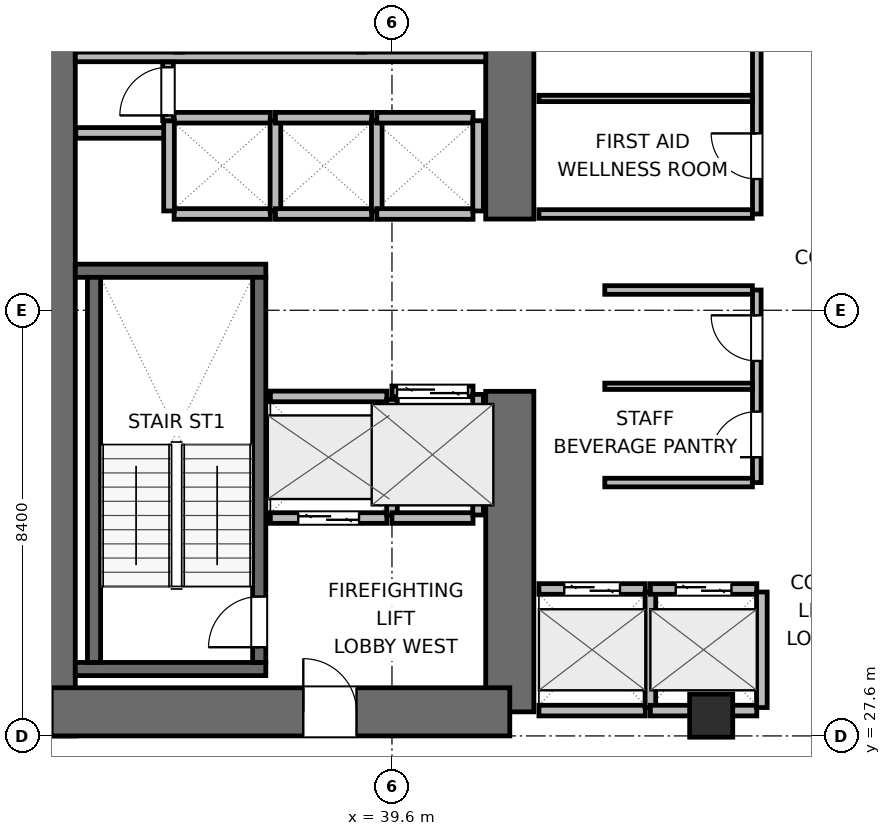
"""IFC4 building model, lengths in metres.
Left out: names, types, materials, properties, quantities, classifications, styles, units other than length and angle.
Written with IfcOpenShell. Run it as: python <this file> out.ifc"""

import sys

from ifc_helpers import new_model, si_unit, direction, frame, frame_2d, origin, origin_2d, place, context, subcontext, project, spatial, rectangle, extrude, element, fill, save


model = new_model("IFC4")
c1 = context("Model", 3, precision=1e-05, world=origin(), true_north=direction((0.0, 1.0)))
c2 = subcontext(c1, "Body", "Model", "MODEL_VIEW")
j1 = project(units=[si_unit("LENGTHUNIT", "METRE"), si_unit("PLANEANGLEUNIT", "RADIAN")], contexts=[c1])
p1 = place(None, origin())
s1 = spatial("IfcSite", under=j1, at=p1, CompositionType="ELEMENT")
p2 = place(p1, origin())
s2 = spatial("IfcBuilding", under=s1, at=p2, CompositionType="ELEMENT")
p3 = place(p2, frame((0.0, 0.0, 56.7)))
s3 = spatial("IfcBuildingStorey", under=s2, at=p3, CompositionType="ELEMENT", Elevation=56.7)
p4 = place(p3, frame((32.875, 27.6, 0.0), z_axis=(0.0, 0.0, 1.0), x_axis=(0.0, 1.0, 0.0)))
e1 = element("IfcWall", 1, at=p4, inside=s3, PredefinedType="SHEAR", context=c2, shape_type="SweptSolid", body=[
    extrude(rectangle(XDim=16.8, YDim=0.95, at=frame_2d((8.4, 0.0))), origin(), (0.0, 0.0, 1.0), 3.9),
])
p5 = place(p3, frame((41.925, 28.075, 0.0), z_axis=(0.0, 0.0, 1.0), x_axis=(0.0, 1.0, 0.0)))
e2 = element("IfcWall", 2, at=p5, inside=s3, PredefinedType="SHEAR", context=c2, shape_type="SweptSolid", body=[
    extrude(rectangle(XDim=6.325, YDim=0.95, at=frame_2d((3.163, 0.0))), origin(), (0.0, 0.0, 1.0), 3.9),
])
p6 = place(p3, frame((41.925, 37.8, 0.0), z_axis=(0.0, 0.0, 1.0), x_axis=(0.0, 1.0, 0.0)))
e3 = element("IfcWall", 3, at=p6, inside=s3, PredefinedType="SHEAR", context=c2, shape_type="SweptSolid", body=[
    extrude(rectangle(XDim=6.125, YDim=0.95, at=frame_2d((3.062, 0.0))), origin(), (0.0, 0.0, 1.0), 3.9),
])
p7 = place(p3, frame((32.875, 28.075, 0.0), z_axis=(0.0, 0.0, 1.0), x_axis=(1.0, 0.0, 0.0)))
e4 = element("IfcWall", 4, at=p7, inside=s3, PredefinedType="SHEAR", context=c2, shape_type="SweptSolid", body=[
    extrude(rectangle(XDim=9.05, YDim=0.95, at=frame_2d((4.525, 0.0))), origin(), (0.0, 0.0, 1.0), 3.9),
])
p8 = place(p7, frame((4.975, 0.0, 0.0)))
e5 = element("IfcOpeningElement", 5, at=p8, cuts=e4, PredefinedType="OPENING", context=c2, shape_type="SweptSolid", body=[
    extrude(rectangle(XDim=1.05, YDim=2.04, at=frame_2d((0.525, 1.02))), frame((0.0, 0.485, 0.0), z_axis=(0.0, -1.0, 0.0), x_axis=(1.0, 0.0, 0.0)), (0.0, 0.0, 1.0), 0.97),
])
for number, where, z_axis, x_axis in (
    (6, (33.35, 28.92, 0.0), (0.0, 0.0, 1.0), (1.0, 0.0, 0.0)),
    (7, (33.35, 36.78, 0.0), (0.0, 0.0, 1.0), (1.0, 0.0, 0.0)),
):
    element("IfcWall", number, at=place(p3, frame(where, z_axis=z_axis, x_axis=x_axis)), inside=s3, PredefinedType="SHEAR", context=c2, shape_type="SweptSolid", body=[
        extrude(rectangle(XDim=3.76, YDim=0.26, at=frame_2d((1.88, 0.0))), origin(), (0.0, 0.0, 1.0), 3.9),
    ])
p9 = place(p3, frame((33.72, 29.05, 0.0), z_axis=(0.0, 0.0, 1.0), x_axis=(0.0, 1.0, 0.0)))
e8 = element("IfcWall", 8, at=p9, inside=s3, PredefinedType="SHEAR", context=c2, shape_type="SweptSolid", body=[
    extrude(rectangle(XDim=7.6, YDim=0.26, at=frame_2d((3.8, 0.0))), origin(), (0.0, 0.0, 1.0), 3.9),
])
p10 = place(p3, frame((36.98, 29.05, 0.0), z_axis=(0.0, 0.0, 1.0), x_axis=(0.0, 1.0, 0.0)))
e9 = element("IfcWall", 9, at=p10, inside=s3, PredefinedType="SHEAR", context=c2, shape_type="SweptSolid", body=[
    extrude(rectangle(XDim=7.6, YDim=0.26, at=frame_2d((3.8, 0.0))), origin(), (0.0, 0.0, 1.0), 3.9),
])
p11 = place(p10, frame((0.3, 0.0, 0.0)))
e10 = element("IfcOpeningElement", 10, at=p11, cuts=e9, PredefinedType="OPENING", context=c2, shape_type="SweptSolid", body=[
    extrude(rectangle(XDim=1.0, YDim=2.04, at=frame_2d((0.5, 1.02))), frame((0.0, 0.14, 0.0), z_axis=(0.0, -1.0, 0.0), x_axis=(1.0, 0.0, 0.0)), (0.0, 0.0, 1.0), 0.28),
])
p12 = place(p3, frame((45.9, 28.0, 0.0), z_axis=(0.0, 0.0, 1.0), x_axis=(1.0, 0.0, 0.0)))
e11 = element("IfcColumn", 11, at=p12, inside=s3, PredefinedType="COLUMN", context=c2, shape_type="SweptSolid", body=[
    extrude(rectangle(XDim=0.85, YDim=0.85, at=origin_2d()), origin(), (0.0, 0.0, 1.0), 3.9),
])
p13 = place(p3, frame((33.35, 41.0, 0.0), z_axis=(0.0, 0.0, 1.0), x_axis=(1.0, 0.0, 0.0)))
e12 = element("IfcWall", 12, at=p13, inside=s3, PredefinedType="PLUMBINGWALL", context=c2, shape_type="SweptSolid", body=[
    extrude(rectangle(XDim=8.1, YDim=0.19, at=frame_2d((4.05, 0.0))), origin(), (0.0, 0.0, 1.0), 3.64),
])
for number, where, z_axis, x_axis in (
    (13, (35.4, 41.095, 0.0), (0.0, 0.0, 1.0), (0.0, 1.0, 0.0)),
    (14, (39.0, 41.095, 0.0), (0.0, 0.0, 1.0), (0.0, 1.0, 0.0)),
):
    element("IfcWall", number, at=place(p3, frame(where, z_axis=z_axis, x_axis=x_axis)), inside=s3, PredefinedType="PARTITIONING", context=c2, shape_type="SweptSolid", body=[
        extrude(rectangle(XDim=2.355, YDim=0.125, at=frame_2d((1.177, 0.0))), origin(), (0.0, 0.0, 1.0), 3.64),
    ])
p14 = place(p3, frame((33.36, 39.5, 0.0), z_axis=(0.0, 0.0, 1.0), x_axis=(1.0, 0.0, 0.0)))
e15 = element("IfcWall", 15, at=p14, inside=s3, PredefinedType="PARTITIONING", context=c2, shape_type="SweptSolid", body=[
    extrude(rectangle(XDim=1.86, YDim=0.21, at=frame_2d((0.93, 0.0))), origin(), (0.0, 0.0, 1.0), 3.64),
])
p15 = place(p3, frame((37.2, 31.9, 0.0), z_axis=(0.0, 0.0, 1.0), x_axis=(1.0, 0.0, 0.0)))
e16 = element("IfcWall", 16, at=p15, inside=s3, PredefinedType="PARTITIONING", context=c2, shape_type="SweptSolid", body=[
    extrude(rectangle(XDim=2.3, YDim=0.21, at=frame_2d((1.15, 0.0))), origin(), (0.0, 0.0, 1.0), 3.64),
])
p16 = place(p15, frame((0.55, 0.0, 0.0)))
e17 = element("IfcOpeningElement", 17, at=p16, cuts=e16, PredefinedType="OPENING", context=c2, shape_type="SweptSolid", body=[
    extrude(rectangle(XDim=1.2, YDim=2.04, at=frame_2d((0.6, 1.02))), frame((0.0, 0.115, 0.0), z_axis=(0.0, -1.0, 0.0), x_axis=(1.0, 0.0, 0.0)), (0.0, 0.0, 1.0), 0.23),
])
p17 = place(p3, frame((37.2, 34.3, 0.0), z_axis=(0.0, 0.0, 1.0), x_axis=(1.0, 0.0, 0.0)))
e18 = element("IfcWall", 18, at=p17, inside=s3, PredefinedType="PARTITIONING", context=c2, shape_type="SweptSolid", body=[
    extrude(rectangle(XDim=2.3, YDim=0.21, at=frame_2d((1.15, 0.0))), origin(), (0.0, 0.0, 1.0), 3.64),
])
p18 = place(p3, frame((39.6, 31.96, 0.0), z_axis=(0.0, 0.0, 1.0), x_axis=(0.0, 1.0, 0.0)))
e19 = element("IfcWall", 19, at=p18, inside=s3, PredefinedType="PARTITIONING", context=c2, shape_type="SweptSolid", body=[
    extrude(rectangle(XDim=2.28, YDim=0.21, at=frame_2d((1.14, 0.0))), origin(), (0.0, 0.0, 1.0), 3.64),
])
p19 = place(p3, frame((39.6, 34.4, 0.0), z_axis=(0.0, 0.0, 1.0), x_axis=(1.0, 0.0, 0.0)))
e20 = element("IfcWall", 20, at=p19, inside=s3, PredefinedType="PARTITIONING", context=c2, shape_type="SweptSolid", body=[
    extrude(rectangle(XDim=1.6, YDim=0.21, at=frame_2d((0.8, 0.0))), origin(), (0.0, 0.0, 1.0), 3.64),
])
p20 = place(p19, frame((0.1, 0.0, 0.0)))
e21 = element("IfcOpeningElement", 21, at=p20, cuts=e20, PredefinedType="OPENING", context=c2, shape_type="SweptSolid", body=[
    extrude(rectangle(XDim=1.4, YDim=2.06, at=frame_2d((0.7, 1.03))), frame((0.0, 0.115, 0.0), z_axis=(0.0, -1.0, 0.0), x_axis=(1.0, 0.0, 0.0)), (0.0, 0.0, 1.0), 0.23),
])
p21 = place(p3, frame((39.6, 31.9, 0.0), z_axis=(0.0, 0.0, 1.0), x_axis=(1.0, 0.0, 0.0)))
e22 = element("IfcWall", 22, at=p21, inside=s3, PredefinedType="PARTITIONING", context=c2, shape_type="SweptSolid", body=[
    extrude(rectangle(XDim=1.6, YDim=0.21, at=frame_2d((0.8, 0.0))), origin(), (0.0, 0.0, 1.0), 3.64),
])
p22 = place(p3, frame((41.3, 31.96, 0.0), z_axis=(0.0, 0.0, 1.0), x_axis=(0.0, 1.0, 0.0)))
e23 = element("IfcWall", 23, at=p22, inside=s3, PredefinedType="PARTITIONING", context=c2, shape_type="SweptSolid", body=[
    extrude(rectangle(XDim=2.38, YDim=0.21, at=frame_2d((1.19, 0.0))), origin(), (0.0, 0.0, 1.0), 3.64),
])
p23 = place(p3, frame((42.5, 30.5, 0.0), z_axis=(0.0, 0.0, 1.0), x_axis=(1.0, 0.0, 0.0)))
e24 = element("IfcWall", 24, at=p23, inside=s3, PredefinedType="PARTITIONING", context=c2, shape_type="SweptSolid", body=[
    extrude(rectangle(XDim=2.1, YDim=0.21, at=frame_2d((1.05, 0.0))), origin(), (0.0, 0.0, 1.0), 3.64),
])
p24 = place(p23, frame((0.5, 0.0, 0.0)))
e25 = element("IfcOpeningElement", 25, at=p24, cuts=e24, PredefinedType="OPENING", context=c2, shape_type="SweptSolid", body=[
    extrude(rectangle(XDim=1.1, YDim=2.04, at=frame_2d((0.55, 1.02))), frame((0.0, 0.115, 0.0), z_axis=(0.0, -1.0, 0.0), x_axis=(1.0, 0.0, 0.0)), (0.0, 0.0, 1.0), 0.23),
])
p25 = place(p3, frame((42.5, 28.1, 0.0), z_axis=(0.0, 0.0, 1.0), x_axis=(1.0, 0.0, 0.0)))
e26 = element("IfcWall", 26, at=p25, inside=s3, PredefinedType="PARTITIONING", context=c2, shape_type="SweptSolid", body=[
    extrude(rectangle(XDim=2.1, YDim=0.21, at=frame_2d((1.05, 0.0))), origin(), (0.0, 0.0, 1.0), 2.525),
])
p26 = place(p3, frame((44.7, 28.16, 0.0), z_axis=(0.0, 0.0, 1.0), x_axis=(0.0, 1.0, 0.0)))
e27 = element("IfcWall", 27, at=p26, inside=s3, PredefinedType="PARTITIONING", context=c2, shape_type="SweptSolid", body=[
    extrude(rectangle(XDim=2.28, YDim=0.21, at=frame_2d((1.14, 0.0))), origin(), (0.0, 0.0, 1.0), 3.64),
])
p27 = place(p3, frame((44.7, 30.5, 0.0), z_axis=(0.0, 0.0, 1.0), x_axis=(1.0, 0.0, 0.0)))
e28 = element("IfcWall", 28, at=p27, inside=s3, PredefinedType="PARTITIONING", context=c2, shape_type="SweptSolid", body=[
    extrude(rectangle(XDim=2.1, YDim=0.21, at=frame_2d((1.05, 0.0))), origin(), (0.0, 0.0, 1.0), 3.64),
])
p28 = place(p27, frame((0.5, 0.0, 0.0)))
e29 = element("IfcOpeningElement", 29, at=p28, cuts=e28, PredefinedType="OPENING", context=c2, shape_type="SweptSolid", body=[
    extrude(rectangle(XDim=1.1, YDim=2.04, at=frame_2d((0.55, 1.02))), frame((0.0, 0.115, 0.0), z_axis=(0.0, -1.0, 0.0), x_axis=(1.0, 0.0, 0.0)), (0.0, 0.0, 1.0), 0.23),
])
p29 = place(p3, frame((44.7, 28.1, 0.0), z_axis=(0.0, 0.0, 1.0), x_axis=(1.0, 0.0, 0.0)))
e30 = element("IfcWall", 30, at=p29, inside=s3, PredefinedType="PARTITIONING", context=c2, shape_type="SweptSolid", body=[
    extrude(rectangle(XDim=2.1, YDim=0.21, at=frame_2d((1.05, 0.0))), origin(), (0.0, 0.0, 1.0), 2.525),
])
p30 = place(p3, frame((46.9, 28.16, 0.0), z_axis=(0.0, 0.0, 1.0), x_axis=(0.0, 1.0, 0.0)))
e31 = element("IfcWall", 31, at=p30, inside=s3, PredefinedType="PARTITIONING", context=c2, shape_type="SweptSolid", body=[
    extrude(rectangle(XDim=2.28, YDim=0.21, at=frame_2d((1.14, 0.0))), origin(), (0.0, 0.0, 1.0), 3.64),
])
for number, where, z_axis, x_axis in (
    (32, (35.3, 37.9, 0.0), (0.0, 0.0, 1.0), (1.0, 0.0, 0.0)),
    (33, (35.3, 39.8, 0.0), (0.0, 0.0, 1.0), (1.0, 0.0, 0.0)),
):
    element("IfcWall", number, at=place(p3, frame(where, z_axis=z_axis, x_axis=x_axis)), inside=s3, PredefinedType="PARTITIONING", context=c2, shape_type="SweptSolid", body=[
        extrude(rectangle(XDim=1.9, YDim=0.21, at=frame_2d((0.95, 0.0))), origin(), (0.0, 0.0, 1.0), 3.64),
    ])
for number, where, z_axis, x_axis in (
    (34, (35.2, 37.96, 0.0), (0.0, 0.0, 1.0), (0.0, 1.0, 0.0)),
    (35, (37.3, 37.96, 0.0), (0.0, 0.0, 1.0), (0.0, 1.0, 0.0)),
):
    element("IfcWall", number, at=place(p3, frame(where, z_axis=z_axis, x_axis=x_axis)), inside=s3, PredefinedType="PARTITIONING", context=c2, shape_type="SweptSolid", body=[
        extrude(rectangle(XDim=1.78, YDim=0.21, at=frame_2d((0.89, 0.0))), origin(), (0.0, 0.0, 1.0), 3.64),
    ])
for number, where, z_axis, x_axis in (
    (36, (37.3, 37.9, 0.0), (0.0, 0.0, 1.0), (1.0, 0.0, 0.0)),
    (37, (37.3, 39.8, 0.0), (0.0, 0.0, 1.0), (1.0, 0.0, 0.0)),
):
    element("IfcWall", number, at=place(p3, frame(where, z_axis=z_axis, x_axis=x_axis)), inside=s3, PredefinedType="PARTITIONING", context=c2, shape_type="SweptSolid", body=[
        extrude(rectangle(XDim=1.9, YDim=0.21, at=frame_2d((0.95, 0.0))), origin(), (0.0, 0.0, 1.0), 3.64),
    ])
p31 = place(p3, frame((39.3, 37.96, 0.0), z_axis=(0.0, 0.0, 1.0), x_axis=(0.0, 1.0, 0.0)))
e38 = element("IfcWall", 38, at=p31, inside=s3, PredefinedType="PARTITIONING", context=c2, shape_type="SweptSolid", body=[
    extrude(rectangle(XDim=1.78, YDim=0.21, at=frame_2d((0.89, 0.0))), origin(), (0.0, 0.0, 1.0), 3.64),
])
for number, where, z_axis, x_axis in (
    (39, (39.3, 37.9, 0.0), (0.0, 0.0, 1.0), (1.0, 0.0, 0.0)),
    (40, (39.3, 39.8, 0.0), (0.0, 0.0, 1.0), (1.0, 0.0, 0.0)),
):
    element("IfcWall", number, at=place(p3, frame(where, z_axis=z_axis, x_axis=x_axis)), inside=s3, PredefinedType="PARTITIONING", context=c2, shape_type="SweptSolid", body=[
        extrude(rectangle(XDim=1.9, YDim=0.21, at=frame_2d((0.95, 0.0))), origin(), (0.0, 0.0, 1.0), 3.64),
    ])
p32 = place(p3, frame((41.3, 37.96, 0.0), z_axis=(0.0, 0.0, 1.0), x_axis=(0.0, 1.0, 0.0)))
e41 = element("IfcWall", 41, at=p32, inside=s3, PredefinedType="PARTITIONING", context=c2, shape_type="SweptSolid", body=[
    extrude(rectangle(XDim=1.78, YDim=0.21, at=frame_2d((0.89, 0.0))), origin(), (0.0, 0.0, 1.0), 3.64),
])
p33 = place(p3, frame((35.18, 39.74, 0.0), z_axis=(0.0, 0.0, 1.0), x_axis=(0.0, 1.0, 0.0)))
e42 = element("IfcWall", 42, at=p33, inside=s3, PredefinedType="PARTITIONING", context=c2, shape_type="SweptSolid", body=[
    extrude(rectangle(XDim=1.16, YDim=0.21, at=frame_2d((0.58, 0.0))), origin(), (0.0, 0.0, 1.0), 3.64),
])
p34 = place(p33, frame((0.105, 0.0, 0.0)))
e43 = element("IfcOpeningElement", 43, at=p34, cuts=e42, PredefinedType="OPENING", context=c2, shape_type="SweptSolid", body=[
    extrude(rectangle(XDim=0.95, YDim=2.04, at=frame_2d((0.475, 1.02))), frame((0.0, 0.115, 0.0), z_axis=(0.0, -1.0, 0.0), x_axis=(1.0, 0.0, 0.0)), (0.0, 0.0, 1.0), 0.23),
])
p35 = place(p3, frame((46.8, 32.6, 0.0), z_axis=(0.0, 0.0, 1.0), x_axis=(0.0, 1.0, 0.0)))
e44 = element("IfcWall", 44, at=p35, inside=s3, PredefinedType="PARTITIONING", context=c2, shape_type="SweptSolid", body=[
    extrude(rectangle(XDim=3.8, YDim=0.17, at=frame_2d((1.9, 0.0))), origin(), (0.0, 0.0, 1.0), 3.64),
])
p36 = place(p35, frame((0.5, 0.0, 0.0)))
e45 = element("IfcOpeningElement", 45, at=p36, cuts=e44, PredefinedType="OPENING", context=c2, shape_type="SweptSolid", body=[
    extrude(rectangle(XDim=0.9, YDim=2.02, at=frame_2d((0.45, 1.01))), frame((0.0, 0.095, 0.0), z_axis=(0.0, -1.0, 0.0), x_axis=(1.0, 0.0, 0.0)), (0.0, 0.0, 1.0), 0.19),
])
p37 = place(p35, frame((2.4, 0.0, 0.0)))
e46 = element("IfcOpeningElement", 46, at=p37, cuts=e44, PredefinedType="OPENING", context=c2, shape_type="SweptSolid", body=[
    extrude(rectangle(XDim=0.9, YDim=2.02, at=frame_2d((0.45, 1.01))), frame((0.0, 0.095, 0.0), z_axis=(0.0, -1.0, 0.0), x_axis=(1.0, 0.0, 0.0)), (0.0, 0.0, 1.0), 0.19),
])
for number, where, z_axis, x_axis in (
    (47, (43.8, 32.6, 0.0), (0.0, 0.0, 1.0), (1.0, 0.0, 0.0)),
    (48, (43.8, 36.4, 0.0), (0.0, 0.0, 1.0), (1.0, 0.0, 0.0)),
):
    element("IfcWall", number, at=place(p3, frame(where, z_axis=z_axis, x_axis=x_axis)), inside=s3, PredefinedType="PARTITIONING", context=c2, shape_type="SweptSolid", body=[
        extrude(rectangle(XDim=2.913, YDim=0.17, at=frame_2d((1.457, 0.0))), origin(), (0.0, 0.0, 1.0), 3.64),
    ])
p38 = place(p3, frame((43.8, 34.5, 0.0), z_axis=(0.0, 0.0, 1.0), x_axis=(1.0, 0.0, 0.0)))
e49 = element("IfcWall", 49, at=p38, inside=s3, PredefinedType="PARTITIONING", context=c2, shape_type="SweptSolid", body=[
    extrude(rectangle(XDim=2.913, YDim=0.125, at=frame_2d((1.457, 0.0))), origin(), (0.0, 0.0, 1.0), 3.64),
])
p39 = place(p3, frame((46.8, 37.9, 0.0), z_axis=(0.0, 0.0, 1.0), x_axis=(0.0, 1.0, 0.0)))
e50 = element("IfcWall", 50, at=p39, inside=s3, PredefinedType="PARTITIONING", context=c2, shape_type="SweptSolid", body=[
    extrude(rectangle(XDim=6.0, YDim=0.17, at=frame_2d((3.0, 0.0))), origin(), (0.0, 0.0, 1.0), 3.64),
])
p40 = place(p39, frame((0.69, 0.0, 0.0)))
e51 = element("IfcOpeningElement", 51, at=p40, cuts=e50, PredefinedType="OPENING", context=c2, shape_type="SweptSolid", body=[
    extrude(rectangle(XDim=0.9, YDim=2.02, at=frame_2d((0.45, 1.01))), frame((0.0, 0.095, 0.0), z_axis=(0.0, -1.0, 0.0), x_axis=(1.0, 0.0, 0.0)), (0.0, 0.0, 1.0), 0.19),
])
p41 = place(p39, frame((3.69, 0.0, 0.0)))
e52 = element("IfcOpeningElement", 52, at=p41, cuts=e50, PredefinedType="OPENING", context=c2, shape_type="SweptSolid", body=[
    extrude(rectangle(XDim=0.9, YDim=2.02, at=frame_2d((0.45, 1.01))), frame((0.0, 0.095, 0.0), z_axis=(0.0, -1.0, 0.0), x_axis=(1.0, 0.0, 0.0)), (0.0, 0.0, 1.0), 0.19),
])
p42 = place(p3, frame((42.5, 37.9, 0.0), z_axis=(0.0, 0.0, 1.0), x_axis=(1.0, 0.0, 0.0)))
e53 = element("IfcWall", 53, at=p42, inside=s3, PredefinedType="PARTITIONING", context=c2, shape_type="SweptSolid", body=[
    extrude(rectangle(XDim=4.213, YDim=0.17, at=frame_2d((2.106, 0.0))), origin(), (0.0, 0.0, 1.0), 3.64),
])
p43 = place(p3, frame((42.5, 40.18, 0.0), z_axis=(0.0, 0.0, 1.0), x_axis=(1.0, 0.0, 0.0)))
e54 = element("IfcWall", 54, at=p43, inside=s3, PredefinedType="PARTITIONING", context=c2, shape_type="SweptSolid", body=[
    extrude(rectangle(XDim=4.213, YDim=0.125, at=frame_2d((2.106, 0.0))), origin(), (0.0, 0.0, 1.0), 3.64),
])
p44 = place(p11, origin())
e55 = element("IfcDoor", 55, at=p44, inside=s3, OperationType="SINGLE_SWING_LEFT", PredefinedType="DOOR", context=c2, shape_type="SweptSolid", body=[
    extrude(rectangle(XDim=1.0, YDim=2.04, at=frame_2d((0.5, 1.02))), frame((0.0, 0.025, 0.0), z_axis=(0.0, -1.0, 0.0), x_axis=(1.0, 0.0, 0.0)), (0.0, 0.0, 1.0), 0.05),
])
fill(e10, e55)
p45 = place(p16, origin())
e56 = element("IfcDoor", 56, at=p45, inside=s3, OperationType="DOUBLE_DOOR_SLIDING", PredefinedType="DOOR", context=c2, shape_type="SweptSolid", body=[
    extrude(rectangle(XDim=1.2, YDim=2.04, at=frame_2d((0.6, 1.02))), frame((0.0, 0.025, 0.0), z_axis=(0.0, -1.0, 0.0), x_axis=(1.0, 0.0, 0.0)), (0.0, 0.0, 1.0), 0.05),
])
fill(e17, e56)
p46 = place(p20, origin())
e57 = element("IfcDoor", 57, at=p46, inside=s3, OperationType="DOUBLE_DOOR_SLIDING", PredefinedType="DOOR", context=c2, shape_type="SweptSolid", body=[
    extrude(rectangle(XDim=1.4, YDim=2.06, at=frame_2d((0.7, 1.03))), frame((0.0, 0.025, 0.0), z_axis=(0.0, -1.0, 0.0), x_axis=(1.0, 0.0, 0.0)), (0.0, 0.0, 1.0), 0.05),
])
fill(e21, e57)
p47 = place(p24, origin())
e58 = element("IfcDoor", 58, at=p47, inside=s3, OperationType="DOUBLE_DOOR_SLIDING", PredefinedType="DOOR", context=c2, shape_type="SweptSolid", body=[
    extrude(rectangle(XDim=1.1, YDim=2.04, at=frame_2d((0.55, 1.02))), frame((0.0, 0.025, 0.0), z_axis=(0.0, -1.0, 0.0), x_axis=(1.0, 0.0, 0.0)), (0.0, 0.0, 1.0), 0.05),
])
fill(e25, e58)
p48 = place(p28, origin())
e59 = element("IfcDoor", 59, at=p48, inside=s3, OperationType="DOUBLE_DOOR_SLIDING", PredefinedType="DOOR", context=c2, shape_type="SweptSolid", body=[
    extrude(rectangle(XDim=1.1, YDim=2.04, at=frame_2d((0.55, 1.02))), frame((0.0, 0.025, 0.0), z_axis=(0.0, -1.0, 0.0), x_axis=(1.0, 0.0, 0.0)), (0.0, 0.0, 1.0), 0.05),
])
fill(e29, e59)
p49 = place(p8, origin())
e60 = element("IfcDoor", 60, at=p49, inside=s3, OperationType="SINGLE_SWING_LEFT", PredefinedType="DOOR", context=c2, shape_type="SweptSolid", body=[
    extrude(rectangle(XDim=1.05, YDim=2.04, at=frame_2d((0.525, 1.02))), frame((0.0, 0.025, 0.0), z_axis=(0.0, -1.0, 0.0), x_axis=(1.0, 0.0, 0.0)), (0.0, 0.0, 1.0), 0.05),
])
fill(e5, e60)
p50 = place(p34, origin())
e61 = element("IfcDoor", 61, at=p50, inside=s3, OperationType="SINGLE_SWING_LEFT", PredefinedType="DOOR", context=c2, shape_type="SweptSolid", body=[
    extrude(rectangle(XDim=0.95, YDim=2.04, at=frame_2d((0.475, 1.02))), frame((0.0, 0.025, 0.0), z_axis=(0.0, -1.0, 0.0), x_axis=(1.0, 0.0, 0.0)), (0.0, 0.0, 1.0), 0.05),
])
fill(e43, e61)
p51 = place(p36, origin())
e62 = element("IfcDoor", 62, at=p51, inside=s3, OperationType="SINGLE_SWING_LEFT", PredefinedType="DOOR", context=c2, shape_type="SweptSolid", body=[
    extrude(rectangle(XDim=0.9, YDim=2.02, at=frame_2d((0.45, 1.01))), frame((0.0, 0.025, 0.0), z_axis=(0.0, -1.0, 0.0), x_axis=(1.0, 0.0, 0.0)), (0.0, 0.0, 1.0), 0.05),
])
fill(e45, e62)
p52 = place(p37, origin())
e63 = element("IfcDoor", 63, at=p52, inside=s3, OperationType="SINGLE_SWING_RIGHT", PredefinedType="DOOR", context=c2, shape_type="SweptSolid", body=[
    extrude(rectangle(XDim=0.9, YDim=2.02, at=frame_2d((0.45, 1.01))), frame((0.0, 0.025, 0.0), z_axis=(0.0, -1.0, 0.0), x_axis=(1.0, 0.0, 0.0)), (0.0, 0.0, 1.0), 0.05),
])
fill(e46, e63)
p53 = place(p40, origin())
e64 = element("IfcDoor", 64, at=p53, inside=s3, OperationType="SINGLE_SWING_RIGHT", PredefinedType="DOOR", context=c2, shape_type="SweptSolid", body=[
    extrude(rectangle(XDim=0.9, YDim=2.02, at=frame_2d((0.45, 1.01))), frame((0.0, 0.025, 0.0), z_axis=(0.0, -1.0, 0.0), x_axis=(1.0, 0.0, 0.0)), (0.0, 0.0, 1.0), 0.05),
])
fill(e51, e64)
save(model, sys.argv[1])
